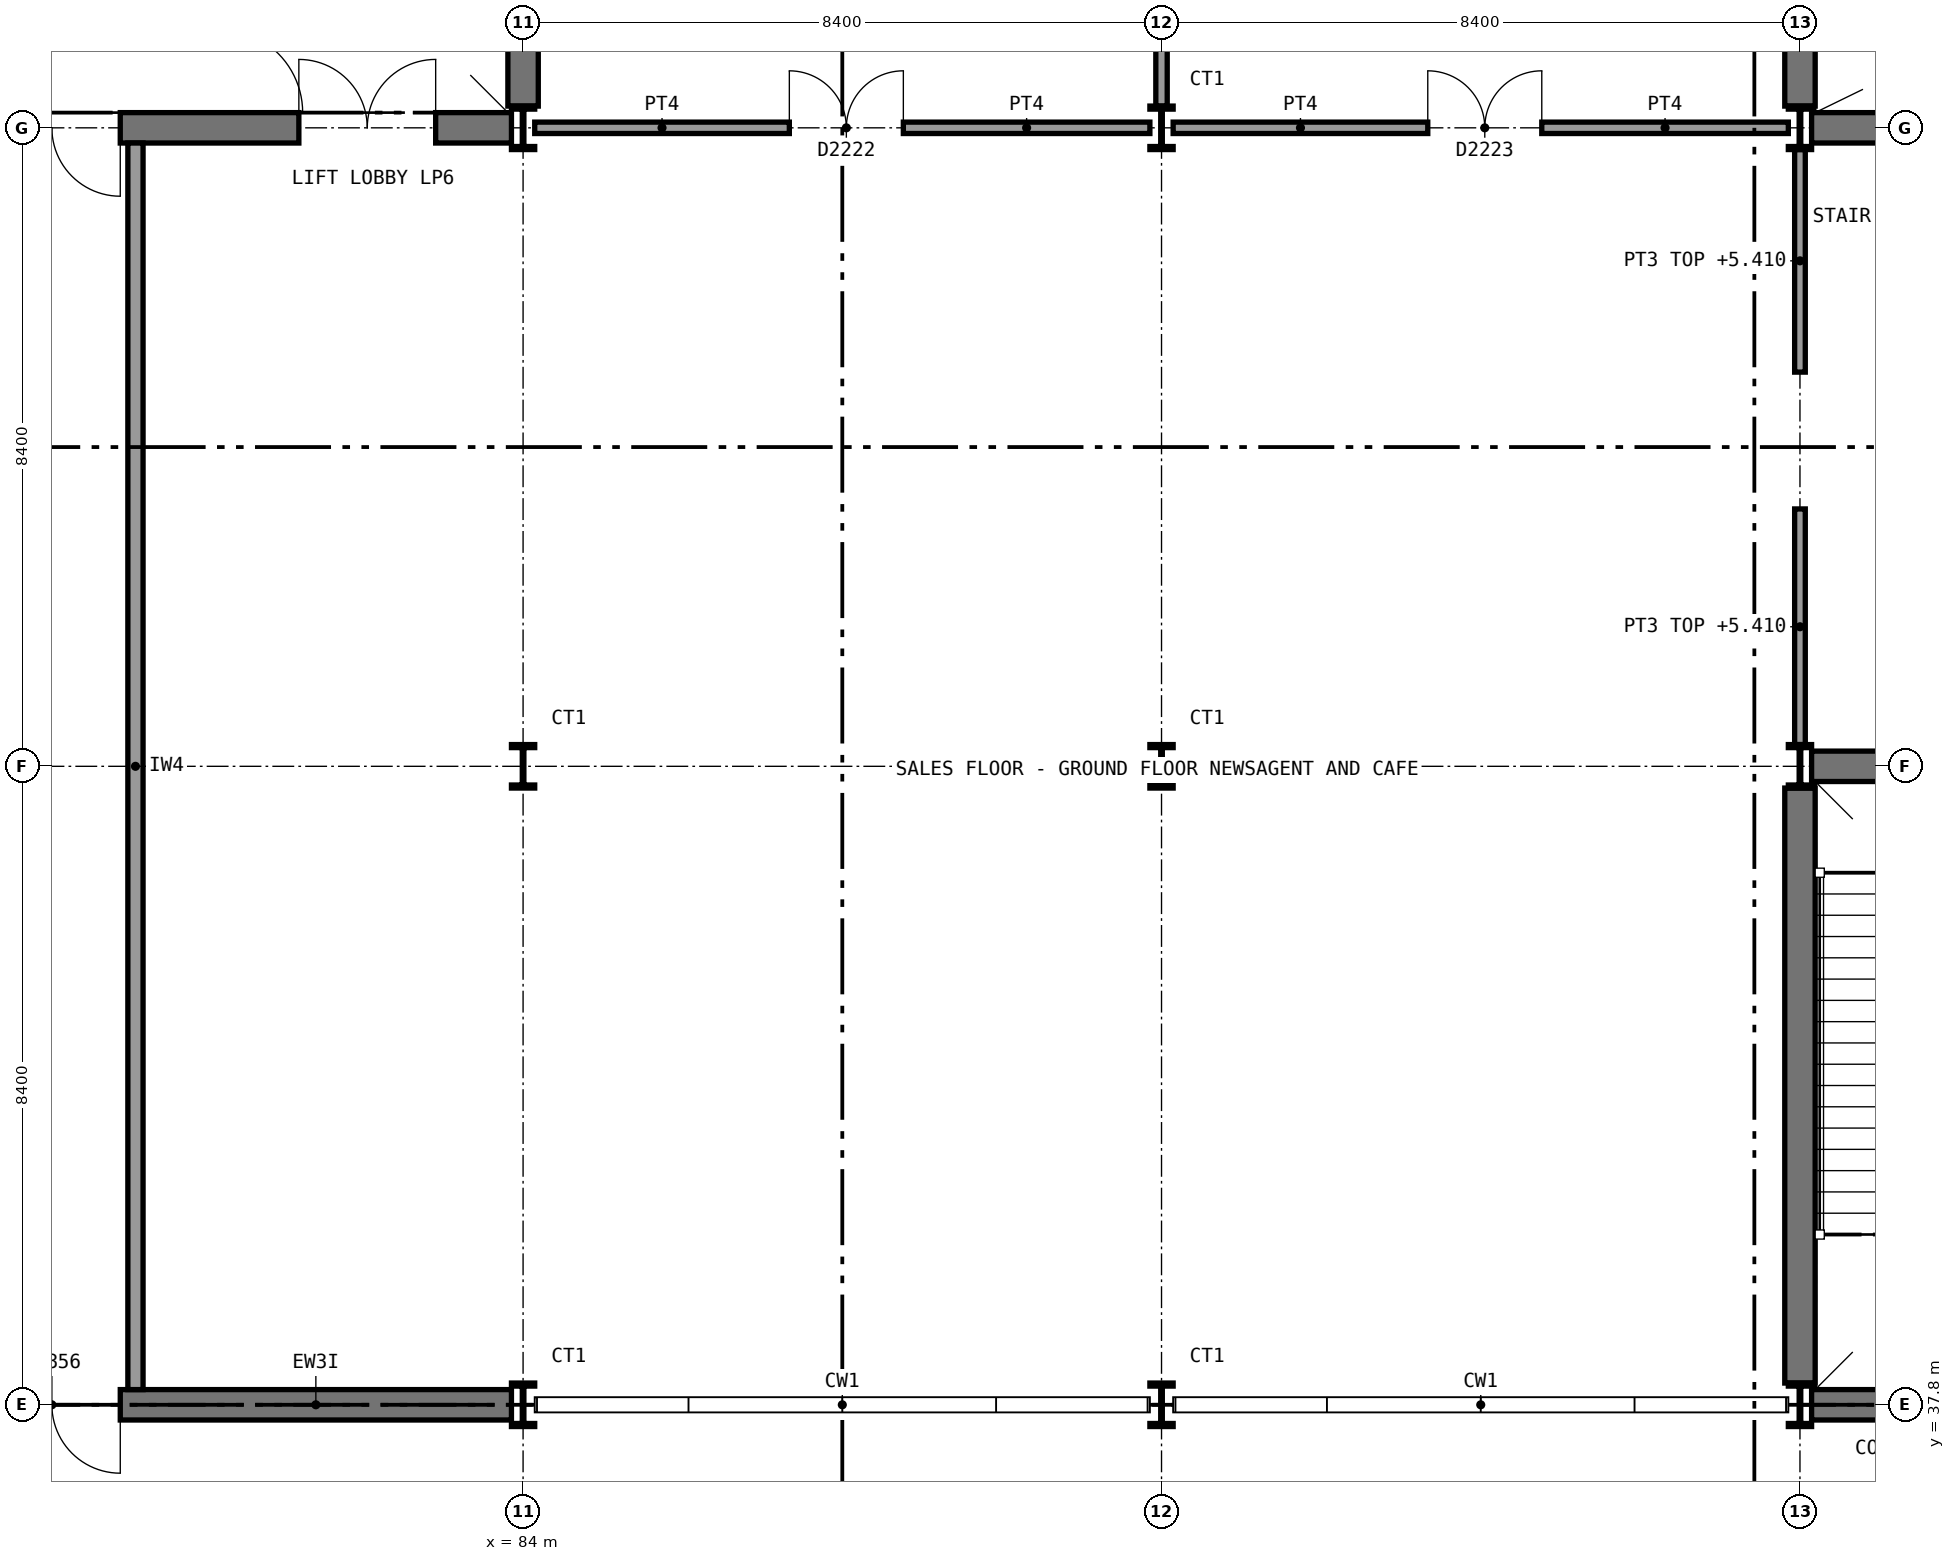
"""IFC4 building model, lengths in metres.
Left out: names, types, materials, properties, quantities, classifications, styles, units other than length and angle.
Written with IfcOpenShell. Run it as: python <this file> out.ifc"""

import sys

from ifc_helpers import new_model, si_unit, direction, frame, frame_2d, origin, origin_2d, place, context, subcontext, project, spatial, rectangle, i_section, extrude, element, fill, save


model = new_model("IFC4")
c1 = context("Model", 3, precision=1e-05, world=origin(), true_north=direction((0.0, 1.0)))
c2 = subcontext(c1, "Body", "Model", "MODEL_VIEW")
j1 = project(units=[si_unit("LENGTHUNIT", "METRE"), si_unit("PLANEANGLEUNIT", "RADIAN")], contexts=[c1])
p1 = place(None, origin())
s1 = spatial("IfcSite", under=j1, at=p1, CompositionType="ELEMENT")
p2 = place(p1, origin())
s2 = spatial("IfcBuilding", under=s1, at=p2, CompositionType="ELEMENT")
p3 = place(p2, origin())
s3 = spatial("IfcBuildingStorey", under=s2, at=p3, CompositionType="ELEMENT", Elevation=0.0)
p4 = place(p3, frame((75.75, 54.6, 0.0), z_axis=(0.0, 0.0, 1.0), x_axis=(1.0, 0.0, 0.0)))
e1 = element("IfcWall", 1, at=p4, inside=s3, PredefinedType="SHEAR", context=c2, shape_type="SweptSolid", body=[
    extrude(rectangle(XDim=8.097, YDim=0.4, at=frame_2d((4.048, 0.0))), origin(), (0.0, 0.0, 1.0), 5.85),
])
p5 = place(p4, frame((5.3, 0.0, 0.0)))
e2 = element("IfcOpeningElement", 2, at=p5, cuts=e1, PredefinedType="OPENING", context=c2, shape_type="SweptSolid", body=[
    extrude(rectangle(XDim=1.8, YDim=2.1, at=frame_2d((0.9, 1.05))), frame((0.0, 0.21, 0.0), z_axis=(0.0, -1.0, 0.0), x_axis=(1.0, 0.0, 0.0)), (0.0, 0.0, 1.0), 0.42),
])
p6 = place(p4, frame((1.15, 0.0, 0.0)))
e3 = element("IfcOpeningElement", 3, at=p6, cuts=e1, PredefinedType="OPENING", context=c2, shape_type="SweptSolid", body=[
    extrude(rectangle(XDim=1.8, YDim=2.1, at=frame_2d((0.9, 1.05))), frame((0.0, 0.21, 0.0), z_axis=(0.0, -1.0, 0.0), x_axis=(1.0, 0.0, 0.0)), (0.0, 0.0, 1.0), 0.42),
])
p7 = place(p3, frame((84.0, 54.886, 0.0), z_axis=(0.0, 0.0, 1.0), x_axis=(0.0, 1.0, 0.0)))
e4 = element("IfcWall", 4, at=p7, inside=s3, PredefinedType="SHEAR", context=c2, shape_type="SweptSolid", body=[
    extrude(rectangle(XDim=7.828, YDim=0.4, at=frame_2d((3.914, 0.0))), origin(), (0.0, 0.0, 1.0), 5.85),
])
p8 = place(p3, frame((100.953, 54.6, 0.0), z_axis=(0.0, 0.0, 1.0), x_axis=(1.0, 0.0, 0.0)))
e5 = element("IfcWall", 5, at=p8, inside=s3, PredefinedType="SHEAR", context=c2, shape_type="SweptSolid", body=[
    extrude(rectangle(XDim=16.361, YDim=0.4, at=frame_2d((8.181, 0.0))), origin(), (0.0, 0.0, 1.0), 5.85),
])
p9 = place(p8, frame((13.547, 0.0, 0.0)))
e6 = element("IfcOpeningElement", 6, at=p9, cuts=e5, PredefinedType="OPENING", context=c2, shape_type="SweptSolid", body=[
    extrude(rectangle(XDim=1.8, YDim=2.1, at=frame_2d((0.9, 1.05))), frame((0.0, 0.21, 0.0), z_axis=(0.0, -1.0, 0.0), x_axis=(1.0, 0.0, 0.0)), (0.0, 0.0, 1.0), 0.42),
])
p10 = place(p8, frame((7.047, 0.0, 0.0)))
e7 = element("IfcOpeningElement", 7, at=p10, cuts=e5, PredefinedType="OPENING", context=c2, shape_type="SweptSolid", body=[
    extrude(rectangle(XDim=2.4, YDim=2.4, at=frame_2d((1.2, 1.2))), frame((0.0, 0.21, 0.0), z_axis=(0.0, -1.0, 0.0), x_axis=(1.0, 0.0, 0.0)), (0.0, 0.0, 1.0), 0.42),
])
p11 = place(p8, frame((1.147, 0.0, 0.0)))
e8 = element("IfcOpeningElement", 8, at=p11, cuts=e5, PredefinedType="OPENING", context=c2, shape_type="SweptSolid", body=[
    extrude(rectangle(XDim=1.8, YDim=2.1, at=frame_2d((0.9, 1.05))), frame((0.0, 0.21, 0.0), z_axis=(0.0, -1.0, 0.0), x_axis=(1.0, 0.0, 0.0)), (0.0, 0.0, 1.0), 0.42),
])
p12 = place(p3, frame((100.8, 54.886, 0.0), z_axis=(0.0, 0.0, 1.0), x_axis=(0.0, 1.0, 0.0)))
e9 = element("IfcWall", 9, at=p12, inside=s3, PredefinedType="SHEAR", context=c2, shape_type="SweptSolid", body=[
    extrude(rectangle(XDim=7.828, YDim=0.4, at=frame_2d((3.914, 0.0))), origin(), (0.0, 0.0, 1.0), 5.85),
])
p13 = place(p3, frame((100.953, 37.8, 0.0), z_axis=(0.0, 0.0, 1.0), x_axis=(1.0, 0.0, 0.0)))
e10 = element("IfcWall", 10, at=p13, inside=s3, PredefinedType="SHEAR", context=c2, shape_type="SweptSolid", body=[
    extrude(rectangle(XDim=8.094, YDim=0.4, at=frame_2d((4.047, 0.0))), origin(), (0.0, 0.0, 1.0), 5.85),
])
p14 = place(p3, frame((100.953, 46.2, 0.0), z_axis=(0.0, 0.0, 1.0), x_axis=(1.0, 0.0, 0.0)))
e11 = element("IfcWall", 11, at=p14, inside=s3, PredefinedType="SHEAR", context=c2, shape_type="SweptSolid", body=[
    extrude(rectangle(XDim=8.094, YDim=0.4, at=frame_2d((4.047, 0.0))), origin(), (0.0, 0.0, 1.0), 5.85),
])
p15 = place(p14, frame((5.597, 0.0, 0.0)))
e12 = element("IfcOpeningElement", 12, at=p15, cuts=e11, PredefinedType="OPENING", context=c2, shape_type="SweptSolid", body=[
    extrude(rectangle(XDim=1.2, YDim=2.1, at=frame_2d((0.6, 1.05))), frame((0.0, 0.21, 0.0), z_axis=(0.0, -1.0, 0.0), x_axis=(1.0, 0.0, 0.0)), (0.0, 0.0, 1.0), 0.42),
])
p16 = place(p14, frame((1.147, 0.0, 0.0)))
e13 = element("IfcOpeningElement", 13, at=p16, cuts=e11, PredefinedType="OPENING", context=c2, shape_type="SweptSolid", body=[
    extrude(rectangle(XDim=1.8, YDim=2.1, at=frame_2d((0.9, 1.05))), frame((0.0, 0.21, 0.0), z_axis=(0.0, -1.0, 0.0), x_axis=(1.0, 0.0, 0.0)), (0.0, 0.0, 1.0), 0.42),
])
p17 = place(p3, frame((100.8, 38.086, 0.0), z_axis=(0.0, 0.0, 1.0), x_axis=(0.0, 1.0, 0.0)))
e14 = element("IfcWall", 14, at=p17, inside=s3, PredefinedType="SHEAR", context=c2, shape_type="SweptSolid", body=[
    extrude(rectangle(XDim=7.828, YDim=0.4, at=frame_2d((3.914, 0.0))), origin(), (0.0, 0.0, 1.0), 5.85),
])
for number, where, z_axis, x_axis in (
    (15, (84.0, 37.8, 0.0), (0.0, 0.0, 1.0), (1.0, 0.0, 0.0)),
    (16, (84.0, 46.2, 0.0), (0.0, 0.0, 1.0), (1.0, 0.0, 0.0)),
    (17, (84.0, 54.6, 0.0), (0.0, 0.0, 1.0), (1.0, 0.0, 0.0)),
    (18, (92.4, 37.8, 0.0), (0.0, 0.0, 1.0), (1.0, 0.0, 0.0)),
    (19, (92.4, 46.2, 0.0), (0.0, 0.0, 1.0), (1.0, 0.0, 0.0)),
    (20, (92.4, 54.6, 0.0), (0.0, 0.0, 1.0), (1.0, 0.0, 0.0)),
    (21, (100.8, 37.8, 0.0), (0.0, 0.0, 1.0), (1.0, 0.0, 0.0)),
    (22, (100.8, 46.2, 0.0), (0.0, 0.0, 1.0), (1.0, 0.0, 0.0)),
    (23, (100.8, 54.6, 0.0), (0.0, 0.0, 1.0), (1.0, 0.0, 0.0)),
):
    element("IfcColumn", number, at=place(p3, frame(where, z_axis=z_axis, x_axis=x_axis)), inside=s3, PredefinedType="COLUMN", context=c2, shape_type="SweptSolid", body=[
        extrude(i_section(OverallWidth=0.306, OverallDepth=0.572, WebThickness=0.021, FlangeThickness=0.04, FilletRadius=0.027, at=origin_2d()), origin(), (0.0, 0.0, 1.0), 6.0),
    ])
p18 = place(p3, frame((92.4, 54.886, 0.0), z_axis=(0.0, 0.0, 1.0), x_axis=(0.0, 1.0, 0.0)))
e24 = element("IfcWall", 24, at=p18, inside=s3, PredefinedType="SOLIDWALL", context=c2, shape_type="SweptSolid", body=[
    extrude(rectangle(XDim=7.828, YDim=0.15, at=frame_2d((3.914, 0.0))), origin(), (0.0, 0.0, 1.0), 5.41),
])
p19 = place(p3, frame((84.153, 54.6, 0.0), z_axis=(0.0, 0.0, 1.0), x_axis=(1.0, 0.0, 0.0)))
e25 = element("IfcWall", 25, at=p19, inside=s3, PredefinedType="SOLIDWALL", context=c2, shape_type="SweptSolid", body=[
    extrude(rectangle(XDim=8.094, YDim=0.15, at=frame_2d((4.047, 0.0))), origin(), (0.0, 0.0, 1.0), 5.52),
])
p20 = place(p19, frame((3.35, 0.0, 0.0)))
e26 = element("IfcOpeningElement", 26, at=p20, cuts=e25, PredefinedType="OPENING", context=c2, shape_type="SweptSolid", body=[
    extrude(rectangle(XDim=1.5, YDim=2.1, at=frame_2d((0.75, 1.05))), frame((0.0, 0.085, 0.0), z_axis=(0.0, -1.0, 0.0), x_axis=(1.0, 0.0, 0.0)), (0.0, 0.0, 1.0), 0.17),
])
p21 = place(p3, frame((92.553, 54.6, 0.0), z_axis=(0.0, 0.0, 1.0), x_axis=(1.0, 0.0, 0.0)))
e27 = element("IfcWall", 27, at=p21, inside=s3, PredefinedType="SOLIDWALL", context=c2, shape_type="SweptSolid", body=[
    extrude(rectangle(XDim=8.094, YDim=0.15, at=frame_2d((4.047, 0.0))), origin(), (0.0, 0.0, 1.0), 5.52),
])
p22 = place(p21, frame((3.35, 0.0, 0.0)))
e28 = element("IfcOpeningElement", 28, at=p22, cuts=e27, PredefinedType="OPENING", context=c2, shape_type="SweptSolid", body=[
    extrude(rectangle(XDim=1.5, YDim=2.1, at=frame_2d((0.75, 1.05))), frame((0.0, 0.085, 0.0), z_axis=(0.0, -1.0, 0.0), x_axis=(1.0, 0.0, 0.0)), (0.0, 0.0, 1.0), 0.17),
])
p23 = place(p3, frame((100.8, 46.486, 0.0), z_axis=(0.0, 0.0, 1.0), x_axis=(0.0, 1.0, 0.0)))
e29 = element("IfcWall", 29, at=p23, inside=s3, PredefinedType="PARTITIONING", context=c2, shape_type="SweptSolid", body=[
    extrude(rectangle(XDim=3.1, YDim=0.14, at=frame_2d((1.55, 0.0))), origin(), (0.0, 0.0, 1.0), 5.41),
])
p24 = place(p3, frame((100.8, 51.386, 0.0), z_axis=(0.0, 0.0, 1.0), x_axis=(0.0, 1.0, 0.0)))
e30 = element("IfcWall", 30, at=p24, inside=s3, PredefinedType="PARTITIONING", context=c2, shape_type="SweptSolid", body=[
    extrude(rectangle(XDim=2.928, YDim=0.14, at=frame_2d((1.464, 0.0))), origin(), (0.0, 0.0, 1.0), 5.41),
])
p25 = place(p3, frame((75.753, 37.8, 0.0), z_axis=(0.0, 0.0, 1.0), x_axis=(1.0, 0.0, 0.0)))
e31 = element("IfcWall", 31, at=p25, inside=s3, PredefinedType="STANDARD", context=c2, shape_type="SweptSolid", body=[
    extrude(rectangle(XDim=8.094, YDim=0.4, at=frame_2d((4.047, 0.0))), origin(), (0.0, 0.0, 1.0), 5.85),
])
p26 = place(p25, frame((1.147, 0.0, 0.0)))
e32 = element("IfcOpeningElement", 32, at=p26, cuts=e31, PredefinedType="OPENING", context=c2, shape_type="SweptSolid", body=[
    extrude(rectangle(XDim=1.8, YDim=2.1, at=frame_2d((0.9, 1.05))), frame((0.0, 0.21, 0.0), z_axis=(0.0, -1.0, 0.0), x_axis=(1.0, 0.0, 0.0)), (0.0, 0.0, 1.0), 0.42),
])
p27 = place(p3, frame((80.0, 62.8, 0.0), z_axis=(0.0, 0.0, 1.0), x_axis=(0.0, -1.0, 0.0)))
e33 = element("IfcWall", 33, at=p27, inside=s3, PredefinedType="SHEAR", context=c2, shape_type="SweptSolid", body=[
    extrude(rectangle(XDim=8.0, YDim=0.2, at=frame_2d((4.0, 0.0))), origin(), (0.0, 0.0, 1.0), 5.85),
])
p28 = place(p27, frame((6.9, 0.0, 0.0)))
e34 = element("IfcOpeningElement", 34, at=p28, cuts=e33, PredefinedType="OPENING", context=c2, shape_type="SweptSolid", body=[
    extrude(rectangle(XDim=1.11, YDim=2.1, at=frame_2d((0.555, 1.05))), frame((0.0, 0.11, 0.0), z_axis=(0.0, -1.0, 0.0), x_axis=(1.0, 0.0, 0.0)), (0.0, 0.0, 1.0), 0.22),
])
p29 = place(p3, frame((78.9, 54.4, 0.0), z_axis=(0.0, 0.0, 1.0), x_axis=(0.0, -1.0, 0.0)))
e35 = element("IfcWall", 35, at=p29, inside=s3, PredefinedType="PARTITIONING", context=c2, shape_type="SweptSolid", body=[
    extrude(rectangle(XDim=16.4, YDim=0.2, at=frame_2d((8.2, 0.0))), origin(), (0.0, 0.0, 1.0), 5.85),
])
p30 = place(p20, origin())
e36 = element("IfcDoor", 36, at=p30, inside=s3, OperationType="DOUBLE_DOOR_SINGLE_SWING", PredefinedType="DOOR", context=c2, shape_type="SweptSolid", body=[
    extrude(rectangle(XDim=1.5, YDim=2.1, at=frame_2d((0.75, 1.05))), frame((0.0, 0.025, 0.0), z_axis=(0.0, -1.0, 0.0), x_axis=(1.0, 0.0, 0.0)), (0.0, 0.0, 1.0), 0.05),
])
fill(e26, e36)
p31 = place(p22, origin())
e37 = element("IfcDoor", 37, at=p31, inside=s3, OperationType="DOUBLE_DOOR_SINGLE_SWING", PredefinedType="DOOR", context=c2, shape_type="SweptSolid", body=[
    extrude(rectangle(XDim=1.5, YDim=2.1, at=frame_2d((0.75, 1.05))), frame((0.0, 0.025, 0.0), z_axis=(0.0, -1.0, 0.0), x_axis=(1.0, 0.0, 0.0)), (0.0, 0.0, 1.0), 0.05),
])
fill(e28, e37)
p32 = place(p28, origin())
e38 = element("IfcDoor", 38, at=p32, inside=s3, OperationType="SINGLE_SWING_RIGHT", PredefinedType="DOOR", context=c2, shape_type="SweptSolid", body=[
    extrude(rectangle(XDim=1.1, YDim=2.1, at=frame_2d((0.55, 1.05))), frame((0.0, 0.025, 0.0), z_axis=(0.0, -1.0, 0.0), x_axis=(1.0, 0.0, 0.0)), (0.0, 0.0, 1.0), 0.05),
])
fill(e34, e38)
p33 = place(p5, origin())
e39 = element("IfcDoor", 39, at=p33, inside=s3, OperationType="DOUBLE_DOOR_SINGLE_SWING", PredefinedType="DOOR", context=c2, shape_type="SweptSolid", body=[
    extrude(rectangle(XDim=1.8, YDim=2.1, at=frame_2d((0.9, 1.05))), frame((0.0, 0.025, 0.0), z_axis=(0.0, -1.0, 0.0), x_axis=(1.0, 0.0, 0.0)), (0.0, 0.0, 1.0), 0.05),
])
fill(e2, e39)
p34 = place(p6, frame((1.8, 0.0, 0.0), z_axis=(0.0, 0.0, 1.0), x_axis=(-1.0, 0.0, 0.0)))
e40 = element("IfcDoor", 40, at=p34, inside=s3, OperationType="DOUBLE_DOOR_SINGLE_SWING", PredefinedType="DOOR", context=c2, shape_type="SweptSolid", body=[
    extrude(rectangle(XDim=1.8, YDim=2.1, at=frame_2d((0.9, 1.05))), frame((0.0, 0.025, 0.0), z_axis=(0.0, -1.0, 0.0), x_axis=(1.0, 0.0, 0.0)), (0.0, 0.0, 1.0), 0.05),
])
fill(e3, e40)
p35 = place(p26, frame((1.8, 0.0, 0.0), z_axis=(0.0, 0.0, 1.0), x_axis=(-1.0, 0.0, 0.0)))
e41 = element("IfcDoor", 41, at=p35, inside=s3, OperationType="DOUBLE_DOOR_SINGLE_SWING", PredefinedType="DOOR", context=c2, shape_type="SweptSolid", body=[
    extrude(rectangle(XDim=1.8, YDim=2.1, at=frame_2d((0.9, 1.05))), frame((0.0, 0.025, 0.0), z_axis=(0.0, -1.0, 0.0), x_axis=(1.0, 0.0, 0.0)), (0.0, 0.0, 1.0), 0.05),
])
fill(e32, e41)
save(model, sys.argv[1])
